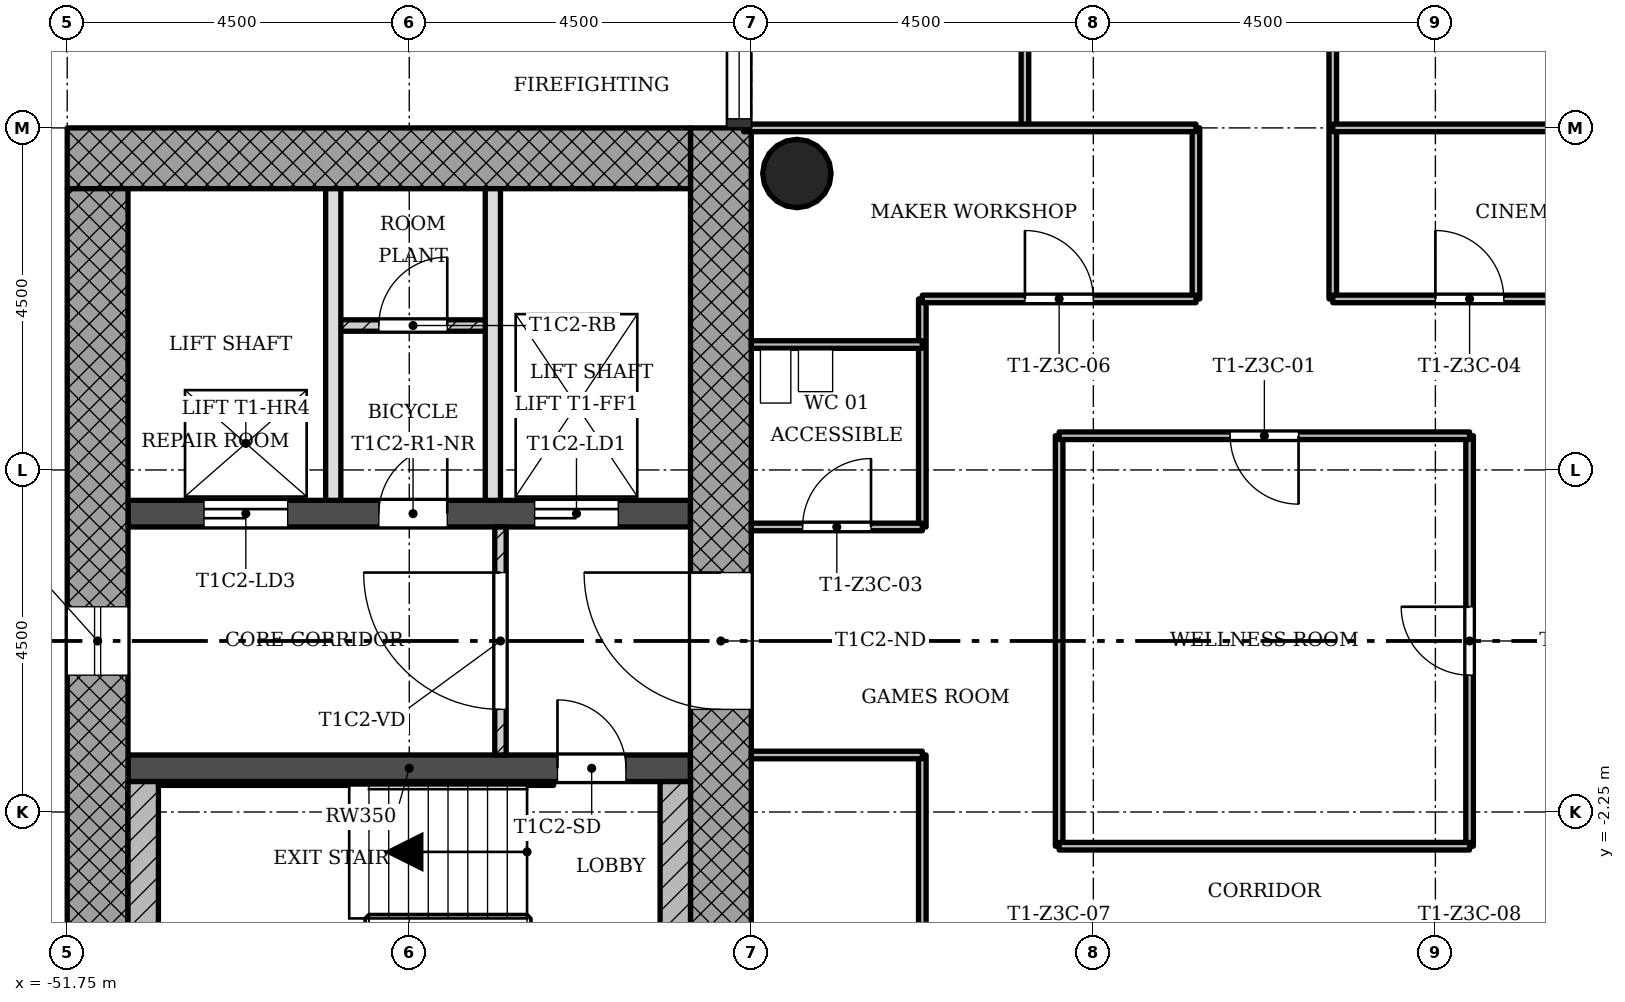
"""IFC4 building model, lengths in metres.
Left out: names, types, materials, properties, quantities, classifications, styles, units other than length and angle.
Written with IfcOpenShell. Run it as: python <this file> out.ifc"""

import sys

from ifc_helpers import new_model, si_unit, direction, frame, frame_2d, origin, origin_2d, place, context, subcontext, project, spatial, rectangle, hollow_circle, extrude, element, fill, save


model = new_model("IFC4")
c1 = context("Model", 3, precision=1e-05, world=origin(), true_north=direction((0.0, 1.0)))
c2 = subcontext(c1, "Body", "Model", "MODEL_VIEW")
j1 = project(units=[si_unit("LENGTHUNIT", "METRE"), si_unit("PLANEANGLEUNIT", "RADIAN")], contexts=[c1])
p1 = place(None, origin())
s1 = spatial("IfcSite", under=j1, at=p1, CompositionType="ELEMENT")
p2 = place(p1, origin())
s2 = spatial("IfcBuilding", under=s1, at=p2, CompositionType="ELEMENT")
p3 = place(p2, frame((0.0, 0.0, 160.9)))
s3 = spatial("IfcBuildingStorey", under=s2, at=p3, CompositionType="ELEMENT", Elevation=160.9)
p4 = place(p3, frame((-43.15, -5.95, 0.0), z_axis=(0.0, 0.0, 1.0), x_axis=(0.0, 1.0, 0.0)))
e1 = element("IfcWall", 1, at=p4, inside=s3, PredefinedType="SHEAR", context=c2, shape_type="SweptSolid", body=[
    extrude(rectangle(XDim=12.7, YDim=0.8, at=frame_2d((6.35, 0.0))), origin(), (0.0, 0.0, 1.0), 3.4),
])
p5 = place(p4, frame((5.05, 0.0, 0.0)))
e2 = element("IfcOpeningElement", 2, at=p5, cuts=e1, PredefinedType="OPENING", context=c2, shape_type="SweptSolid", body=[
    extrude(rectangle(XDim=1.8, YDim=2.1, at=frame_2d((0.9, 1.05))), frame((0.0, 0.41, 0.0), z_axis=(0.0, -1.0, 0.0), x_axis=(1.0, 0.0, 0.0)), (0.0, 0.0, 1.0), 0.82),
])
p6 = place(p3, frame((-43.55, 6.35, 0.0), z_axis=(0.0, 0.0, 1.0), x_axis=(-1.0, 0.0, 0.0)))
e3 = element("IfcWall", 3, at=p6, inside=s3, PredefinedType="SHEAR", context=c2, shape_type="SweptSolid", body=[
    extrude(rectangle(XDim=8.2, YDim=0.8, at=frame_2d((4.1, 0.0))), origin(), (0.0, 0.0, 1.0), 3.4),
])
p7 = place(p3, frame((-51.35, 5.95, 0.0), z_axis=(0.0, 0.0, 1.0), x_axis=(0.0, -1.0, 0.0)))
e4 = element("IfcWall", 4, at=p7, inside=s3, PredefinedType="SHEAR", context=c2, shape_type="SweptSolid", body=[
    extrude(rectangle(XDim=12.7, YDim=0.8, at=frame_2d((6.35, 0.0))), origin(), (0.0, 0.0, 1.0), 3.4),
])
p8 = place(p7, frame((5.5, 0.0, 0.45)))
e5 = element("IfcOpeningElement", 5, at=p8, cuts=e4, PredefinedType="OPENING", context=c2, shape_type="SweptSolid", body=[
    extrude(rectangle(XDim=0.9, YDim=2.4, at=frame_2d((0.45, 1.2))), frame((0.0, 0.41, 0.0), z_axis=(0.0, -1.0, 0.0), x_axis=(1.0, 0.0, 0.0)), (0.0, 0.0, 1.0), 0.82),
])
p9 = place(p3, frame((-50.95, -1.675, 0.0), z_axis=(0.0, 0.0, 1.0), x_axis=(1.0, 0.0, 0.0)))
e6 = element("IfcWall", 6, at=p9, inside=s3, PredefinedType="SHEAR", context=c2, shape_type="SweptSolid", body=[
    extrude(rectangle(XDim=7.4, YDim=0.35, at=frame_2d((3.7, 0.0))), origin(), (0.0, 0.0, 1.0), 3.4),
])
p10 = place(p9, frame((5.65, 0.0, 0.0)))
e7 = element("IfcOpeningElement", 7, at=p10, cuts=e6, PredefinedType="OPENING", context=c2, shape_type="SweptSolid", body=[
    extrude(rectangle(XDim=0.9, YDim=2.1, at=frame_2d((0.45, 1.05))), frame((0.0, 0.185, 0.0), z_axis=(0.0, -1.0, 0.0), x_axis=(1.0, 0.0, 0.0)), (0.0, 0.0, 1.0), 0.37),
])
p11 = place(p3, frame((-50.95, 1.675, 0.0), z_axis=(0.0, 0.0, 1.0), x_axis=(1.0, 0.0, 0.0)))
e8 = element("IfcWall", 8, at=p11, inside=s3, PredefinedType="SHEAR", context=c2, shape_type="SweptSolid", body=[
    extrude(rectangle(XDim=7.4, YDim=0.35, at=frame_2d((3.7, 0.0))), origin(), (0.0, 0.0, 1.0), 3.4),
])
p12 = place(p11, frame((5.35, 0.0, 0.0)))
e9 = element("IfcOpeningElement", 9, at=p12, cuts=e8, PredefinedType="OPENING", context=c2, shape_type="SweptSolid", body=[
    extrude(rectangle(XDim=1.1, YDim=2.1, at=frame_2d((0.55, 1.05))), frame((0.0, 0.185, 0.0), z_axis=(0.0, -1.0, 0.0), x_axis=(1.0, 0.0, 0.0)), (0.0, 0.0, 1.0), 0.37),
])
p13 = place(p11, frame((1.0, 0.0, 0.0)))
e10 = element("IfcOpeningElement", 10, at=p13, cuts=e8, PredefinedType="OPENING", context=c2, shape_type="SweptSolid", body=[
    extrude(rectangle(XDim=1.1, YDim=2.1, at=frame_2d((0.55, 1.05))), frame((0.0, 0.185, 0.0), z_axis=(0.0, -1.0, 0.0), x_axis=(1.0, 0.0, 0.0)), (0.0, 0.0, 1.0), 0.37),
])
p14 = place(p11, frame((3.3, 0.0, 0.0)))
e11 = element("IfcOpeningElement", 11, at=p14, cuts=e8, PredefinedType="OPENING", context=c2, shape_type="SweptSolid", body=[
    extrude(rectangle(XDim=0.9, YDim=2.1, at=frame_2d((0.45, 1.05))), frame((0.0, 0.185, 0.0), z_axis=(0.0, -1.0, 0.0), x_axis=(1.0, 0.0, 0.0)), (0.0, 0.0, 1.0), 0.37),
])
p15 = place(p3, frame((-42.15, 6.15, 0.0), z_axis=(0.0, 0.0, 1.0), x_axis=(1.0, 0.0, 0.0)))
e12 = element("IfcColumn", 12, at=p15, inside=s3, PredefinedType="COLUMN", context=c2, shape_type="SweptSolid", body=[
    extrude(hollow_circle(Radius=0.45, WallThickness=0.032, at=origin_2d()), origin(), (0.0, 0.0, 1.0), 3.4),
])
p16 = place(p3, frame((-46.05, 1.5, 0.0), z_axis=(0.0, 0.0, 1.0), x_axis=(0.0, -1.0, 0.0)))
e13 = element("IfcWall", 13, at=p16, inside=s3, PredefinedType="PARTITIONING", context=c2, shape_type="SweptSolid", body=[
    extrude(rectangle(XDim=3.0, YDim=0.15, at=frame_2d((1.5, 0.0))), origin(), (0.0, 0.0, 1.0), 3.0),
])
p17 = place(p16, frame((0.6, 0.0, 0.0)))
e14 = element("IfcOpeningElement", 14, at=p17, cuts=e13, PredefinedType="OPENING", context=c2, shape_type="SweptSolid", body=[
    extrude(rectangle(XDim=1.8, YDim=2.1, at=frame_2d((0.9, 1.05))), frame((0.0, 0.085, 0.0), z_axis=(0.0, -1.0, 0.0), x_axis=(1.0, 0.0, 0.0)), (0.0, 0.0, 1.0), 0.17),
])
for number, where, z_axis, x_axis in (
    (15, (-48.25, 5.95, 0.0), (0.0, 0.0, 1.0), (0.0, -1.0, 0.0)),
    (16, (-46.15, 5.95, 0.0), (0.0, 0.0, 1.0), (0.0, -1.0, 0.0)),
):
    element("IfcWall", number, at=place(p3, frame(where, z_axis=z_axis, x_axis=x_axis)), inside=s3, PredefinedType="SOLIDWALL", context=c2, shape_type="SweptSolid", body=[
        extrude(rectangle(XDim=4.1, YDim=0.2, at=frame_2d((2.05, 0.0))), origin(), (0.0, 0.0, 1.0), 3.0),
    ])
p18 = place(p3, frame((-46.15, 4.15, 0.0), z_axis=(0.0, 0.0, 1.0), x_axis=(-1.0, 0.0, 0.0)))
e17 = element("IfcWall", 17, at=p18, inside=s3, PredefinedType="PARTITIONING", context=c2, shape_type="SweptSolid", body=[
    extrude(rectangle(XDim=2.1, YDim=0.15, at=frame_2d((1.05, 0.0))), origin(), (0.0, 0.0, 1.0), 3.0),
])
p19 = place(p18, frame((0.6, 0.0, 0.0)))
e18 = element("IfcOpeningElement", 18, at=p19, cuts=e17, PredefinedType="OPENING", context=c2, shape_type="SweptSolid", body=[
    extrude(rectangle(XDim=0.9, YDim=2.1, at=frame_2d((0.45, 1.05))), frame((0.0, 0.085, 0.0), z_axis=(0.0, -1.0, 0.0), x_axis=(1.0, 0.0, 0.0)), (0.0, 0.0, 1.0), 0.17),
])
for number, where, z_axis, x_axis in (
    (19, (-40.5, -4.5, 0.0), (0.0, 0.0, 1.0), (0.0, 1.0, 0.0)),
    (20, (-40.5, 1.5, 0.0), (0.0, 0.0, 1.0), (0.0, 1.0, 0.0)),
):
    element("IfcWall", number, at=place(p3, frame(where, z_axis=z_axis, x_axis=x_axis)), inside=s3, PredefinedType="PARTITIONING", context=c2, shape_type="SweptSolid", body=[
        extrude(rectangle(XDim=3.0, YDim=0.1, at=frame_2d((1.5, 0.0))), origin(), (0.0, 0.0, 1.0), 3.0),
    ])
p20 = place(p3, frame((-39.15, 6.75, 0.0), z_axis=(0.0, 0.0, 1.0), x_axis=(0.0, 1.0, 0.0)))
e21 = element("IfcWall", 21, at=p20, inside=s3, PredefinedType="PARTITIONING", context=c2, shape_type="SweptSolid", body=[
    extrude(rectangle(XDim=4.5, YDim=0.1, at=frame_2d((2.25, 0.0))), origin(), (0.0, 0.0, 1.0), 3.0),
])
p21 = place(p20, frame((1.8, 0.0, 0.0)))
e22 = element("IfcOpeningElement", 22, at=p21, cuts=e21, PredefinedType="OPENING", context=c2, shape_type="SweptSolid", body=[
    extrude(rectangle(XDim=0.9, YDim=2.1, at=frame_2d((0.45, 1.05))), frame((0.0, 0.06, 0.0), z_axis=(0.0, -1.0, 0.0), x_axis=(1.0, 0.0, 0.0)), (0.0, 0.0, 1.0), 0.12),
])
p22 = place(p3, frame((-38.7, -2.7, 0.0), z_axis=(0.0, 0.0, 1.0), x_axis=(0.0, 1.0, 0.0)))
e23 = element("IfcWall", 23, at=p22, inside=s3, PredefinedType="PARTITIONING", context=c2, shape_type="SweptSolid", body=[
    extrude(rectangle(XDim=5.4, YDim=0.1, at=frame_2d((2.7, 0.0))), origin(), (0.0, 0.0, 1.0), 3.0),
])
p23 = place(p3, frame((-36.9, 4.5, 0.0), z_axis=(0.0, 0.0, 1.0), x_axis=(0.0, 1.0, 0.0)))
e24 = element("IfcWall", 24, at=p23, inside=s3, PredefinedType="PARTITIONING", context=c2, shape_type="SweptSolid", body=[
    extrude(rectangle(XDim=2.25, YDim=0.1, at=frame_2d((1.125, 0.0))), origin(), (0.0, 0.0, 1.0), 3.0),
])
p24 = place(p3, frame((-35.1, 4.5, 0.0), z_axis=(0.0, 0.0, 1.0), x_axis=(0.0, 1.0, 0.0)))
e25 = element("IfcWall", 25, at=p24, inside=s3, PredefinedType="PARTITIONING", context=c2, shape_type="SweptSolid", body=[
    extrude(rectangle(XDim=4.05, YDim=0.1, at=frame_2d((2.025, 0.0))), origin(), (0.0, 0.0, 1.0), 3.0),
])
p25 = place(p3, frame((-33.3, -2.7, 0.0), z_axis=(0.0, 0.0, 1.0), x_axis=(0.0, 1.0, 0.0)))
e26 = element("IfcWall", 26, at=p25, inside=s3, PredefinedType="PARTITIONING", context=c2, shape_type="SweptSolid", body=[
    extrude(rectangle(XDim=5.4, YDim=0.1, at=frame_2d((2.7, 0.0))), origin(), (0.0, 0.0, 1.0), 3.0),
])
p26 = place(p25, frame((2.25, 0.0, 0.0)))
e27 = element("IfcOpeningElement", 27, at=p26, cuts=e26, PredefinedType="OPENING", context=c2, shape_type="SweptSolid", body=[
    extrude(rectangle(XDim=0.9, YDim=2.1, at=frame_2d((0.45, 1.05))), frame((0.0, 0.06, 0.0), z_axis=(0.0, -1.0, 0.0), x_axis=(1.0, 0.0, 0.0)), (0.0, 0.0, 1.0), 0.12),
])
p27 = place(p3, frame((-38.7, -2.7, 0.0), z_axis=(0.0, 0.0, 1.0), x_axis=(1.0, 0.0, 0.0)))
e28 = element("IfcWall", 28, at=p27, inside=s3, PredefinedType="PARTITIONING", context=c2, shape_type="SweptSolid", body=[
    extrude(rectangle(XDim=5.4, YDim=0.1, at=frame_2d((2.7, 0.0))), origin(), (0.0, 0.0, 1.0), 3.0),
])
p28 = place(p3, frame((-42.75, -1.5, 0.0), z_axis=(0.0, 0.0, 1.0), x_axis=(1.0, 0.0, 0.0)))
e29 = element("IfcWall", 29, at=p28, inside=s3, PredefinedType="PARTITIONING", context=c2, shape_type="SweptSolid", body=[
    extrude(rectangle(XDim=2.25, YDim=0.1, at=frame_2d((1.125, 0.0))), origin(), (0.0, 0.0, 1.0), 3.0),
])
p29 = place(p3, frame((-42.75, 1.5, 0.0), z_axis=(0.0, 0.0, 1.0), x_axis=(1.0, 0.0, 0.0)))
e30 = element("IfcWall", 30, at=p29, inside=s3, PredefinedType="PARTITIONING", context=c2, shape_type="SweptSolid", body=[
    extrude(rectangle(XDim=2.25, YDim=0.1, at=frame_2d((1.125, 0.0))), origin(), (0.0, 0.0, 1.0), 3.0),
])
p30 = place(p29, frame((0.675, 0.0, 0.0)))
e31 = element("IfcOpeningElement", 31, at=p30, cuts=e30, PredefinedType="OPENING", context=c2, shape_type="SweptSolid", body=[
    extrude(rectangle(XDim=0.9, YDim=2.1, at=frame_2d((0.45, 1.05))), frame((0.0, 0.06, 0.0), z_axis=(0.0, -1.0, 0.0), x_axis=(1.0, 0.0, 0.0)), (0.0, 0.0, 1.0), 0.12),
])
p31 = place(p3, frame((-38.7, 2.7, 0.0), z_axis=(0.0, 0.0, 1.0), x_axis=(1.0, 0.0, 0.0)))
e32 = element("IfcWall", 32, at=p31, inside=s3, PredefinedType="PARTITIONING", context=c2, shape_type="SweptSolid", body=[
    extrude(rectangle(XDim=5.4, YDim=0.1, at=frame_2d((2.7, 0.0))), origin(), (0.0, 0.0, 1.0), 3.0),
])
p32 = place(p31, frame((2.25, 0.0, 0.0)))
e33 = element("IfcOpeningElement", 33, at=p32, cuts=e32, PredefinedType="OPENING", context=c2, shape_type="SweptSolid", body=[
    extrude(rectangle(XDim=0.9, YDim=2.1, at=frame_2d((0.45, 1.05))), frame((0.0, 0.06, 0.0), z_axis=(0.0, -1.0, 0.0), x_axis=(1.0, 0.0, 0.0)), (0.0, 0.0, 1.0), 0.12),
])
p33 = place(p3, frame((-42.75, 3.9, 0.0), z_axis=(0.0, 0.0, 1.0), x_axis=(1.0, 0.0, 0.0)))
e34 = element("IfcWall", 34, at=p33, inside=s3, PredefinedType="PARTITIONING", context=c2, shape_type="SweptSolid", body=[
    extrude(rectangle(XDim=2.25, YDim=0.1, at=frame_2d((1.125, 0.0))), origin(), (0.0, 0.0, 1.0), 3.0),
])
p34 = place(p3, frame((-40.5, 4.5, 0.0), z_axis=(0.0, 0.0, 1.0), x_axis=(1.0, 0.0, 0.0)))
e35 = element("IfcWall", 35, at=p34, inside=s3, PredefinedType="PARTITIONING", context=c2, shape_type="SweptSolid", body=[
    extrude(rectangle(XDim=3.6, YDim=0.1, at=frame_2d((1.8, 0.0))), origin(), (0.0, 0.0, 1.0), 3.0),
])
p35 = place(p34, frame((1.35, 0.0, 0.0)))
e36 = element("IfcOpeningElement", 36, at=p35, cuts=e35, PredefinedType="OPENING", context=c2, shape_type="SweptSolid", body=[
    extrude(rectangle(XDim=0.9, YDim=2.1, at=frame_2d((0.45, 1.05))), frame((0.0, 0.06, 0.0), z_axis=(0.0, -1.0, 0.0), x_axis=(1.0, 0.0, 0.0)), (0.0, 0.0, 1.0), 0.12),
])
p36 = place(p3, frame((-35.1, 4.5, 0.0), z_axis=(0.0, 0.0, 1.0), x_axis=(1.0, 0.0, 0.0)))
e37 = element("IfcWall", 37, at=p36, inside=s3, PredefinedType="PARTITIONING", context=c2, shape_type="SweptSolid", body=[
    extrude(rectangle(XDim=5.85, YDim=0.1, at=frame_2d((2.925, 0.0))), origin(), (0.0, 0.0, 1.0), 3.0),
])
p37 = place(p36, frame((1.35, 0.0, 0.0)))
e38 = element("IfcOpeningElement", 38, at=p37, cuts=e37, PredefinedType="OPENING", context=c2, shape_type="SweptSolid", body=[
    extrude(rectangle(XDim=0.9, YDim=2.1, at=frame_2d((0.45, 1.05))), frame((0.0, 0.06, 0.0), z_axis=(0.0, -1.0, 0.0), x_axis=(1.0, 0.0, 0.0)), (0.0, 0.0, 1.0), 0.12),
])
for number, where, z_axis, x_axis in (
    (39, (-42.85, 6.75, 0.0), (0.0, 0.0, 1.0), (1.0, 0.0, 0.0)),
    (40, (-35.1, 6.75, 0.0), (0.0, 0.0, 1.0), (1.0, 0.0, 0.0)),
):
    element("IfcWall", number, at=place(p3, frame(where, z_axis=z_axis, x_axis=x_axis)), inside=s3, PredefinedType="PARTITIONING", context=c2, shape_type="SweptSolid", body=[
        extrude(rectangle(XDim=5.95, YDim=0.1, at=frame_2d((2.975, 0.0))), origin(), (0.0, 0.0, 1.0), 3.0),
    ])
for number, where, z_axis, x_axis in (
    (41, (-50.75, -1.85, 0.0), (0.0, 0.0, 1.0), (0.0, -1.0, 0.0)),
    (42, (-43.75, -1.85, 0.0), (0.0, 0.0, 1.0), (0.0, -1.0, 0.0)),
):
    element("IfcWall", number, at=place(p3, frame(where, z_axis=z_axis, x_axis=x_axis)), inside=s3, PredefinedType="SHEAR", context=c2, shape_type="SweptSolid", body=[
        extrude(rectangle(XDim=4.1, YDim=0.4, at=frame_2d((2.05, 0.0))), origin(), (0.0, 0.0, 1.0), 3.4),
    ])
p38 = place(p3, frame((-45.35, -1.875, 0.0), z_axis=(0.0, 0.0, 1.0), x_axis=(-1.0, 0.0, 0.0)))
e43 = element("IfcWall", 43, at=p38, inside=s3, PredefinedType="SHEAR", context=c2, shape_type="SweptSolid", body=[
    extrude(rectangle(XDim=5.2, YDim=0.05, at=frame_2d((2.6, 0.0))), origin(), (0.0, 0.0, 1.0), 3.4),
])
p39 = place(p8, origin())
e44 = element("IfcWindow", 44, at=p39, inside=s3, PartitioningType="SINGLE_PANEL", PredefinedType="WINDOW", context=c2, shape_type="SweptSolid", body=[
    extrude(rectangle(XDim=0.9, YDim=2.4, at=frame_2d((0.45, 1.2))), frame((0.0, 0.03, 0.0), z_axis=(0.0, -1.0, 0.0), x_axis=(1.0, 0.0, 0.0)), (0.0, 0.0, 1.0), 0.06),
])
fill(e5, e44)
p40 = place(p17, origin())
e45 = element("IfcDoor", 45, at=p40, inside=s3, OperationType="SINGLE_SWING_LEFT", PredefinedType="DOOR", context=c2, shape_type="SweptSolid", body=[
    extrude(rectangle(XDim=1.8, YDim=2.1, at=frame_2d((0.9, 1.05))), frame((0.0, 0.025, 0.0), z_axis=(0.0, -1.0, 0.0), x_axis=(1.0, 0.0, 0.0)), (0.0, 0.0, 1.0), 0.05),
])
fill(e14, e45)
p41 = place(p19, origin())
e46 = element("IfcDoor", 46, at=p41, inside=s3, OperationType="SINGLE_SWING_LEFT", PredefinedType="DOOR", context=c2, shape_type="SweptSolid", body=[
    extrude(rectangle(XDim=0.9, YDim=2.1, at=frame_2d((0.45, 1.05))), frame((0.0, 0.025, 0.0), z_axis=(0.0, -1.0, 0.0), x_axis=(1.0, 0.0, 0.0)), (0.0, 0.0, 1.0), 0.05),
])
fill(e18, e46)
p42 = place(p32, origin())
e47 = element("IfcDoor", 47, at=p42, inside=s3, OperationType="SINGLE_SWING_RIGHT", PredefinedType="DOOR", context=c2, shape_type="SweptSolid", body=[
    extrude(rectangle(XDim=0.9, YDim=2.1, at=frame_2d((0.45, 1.05))), frame((0.0, 0.025, 0.0), z_axis=(0.0, -1.0, 0.0), x_axis=(1.0, 0.0, 0.0)), (0.0, 0.0, 1.0), 0.05),
])
fill(e33, e47)
p43 = place(p26, origin())
e48 = element("IfcDoor", 48, at=p43, inside=s3, OperationType="SINGLE_SWING_LEFT", PredefinedType="DOOR", context=c2, shape_type="SweptSolid", body=[
    extrude(rectangle(XDim=0.9, YDim=2.1, at=frame_2d((0.45, 1.05))), frame((0.0, 0.025, 0.0), z_axis=(0.0, -1.0, 0.0), x_axis=(1.0, 0.0, 0.0)), (0.0, 0.0, 1.0), 0.05),
])
fill(e27, e48)
p44 = place(p30, origin())
e49 = element("IfcDoor", 49, at=p44, inside=s3, OperationType="SINGLE_SWING_LEFT", PredefinedType="DOOR", context=c2, shape_type="SweptSolid", body=[
    extrude(rectangle(XDim=0.9, YDim=2.1, at=frame_2d((0.45, 1.05))), frame((0.0, 0.025, 0.0), z_axis=(0.0, -1.0, 0.0), x_axis=(1.0, 0.0, 0.0)), (0.0, 0.0, 1.0), 0.05),
])
fill(e31, e49)
p45 = place(p37, origin())
e50 = element("IfcDoor", 50, at=p45, inside=s3, OperationType="SINGLE_SWING_RIGHT", PredefinedType="DOOR", context=c2, shape_type="SweptSolid", body=[
    extrude(rectangle(XDim=0.9, YDim=2.1, at=frame_2d((0.45, 1.05))), frame((0.0, 0.025, 0.0), z_axis=(0.0, -1.0, 0.0), x_axis=(1.0, 0.0, 0.0)), (0.0, 0.0, 1.0), 0.05),
])
fill(e38, e50)
p46 = place(p35, origin())
e51 = element("IfcDoor", 51, at=p46, inside=s3, OperationType="SINGLE_SWING_RIGHT", PredefinedType="DOOR", context=c2, shape_type="SweptSolid", body=[
    extrude(rectangle(XDim=0.9, YDim=2.1, at=frame_2d((0.45, 1.05))), frame((0.0, 0.025, 0.0), z_axis=(0.0, -1.0, 0.0), x_axis=(1.0, 0.0, 0.0)), (0.0, 0.0, 1.0), 0.05),
])
fill(e36, e51)
p47 = place(p10, origin())
e52 = element("IfcDoor", 52, at=p47, inside=s3, OperationType="SINGLE_SWING_RIGHT", PredefinedType="DOOR", context=c2, shape_type="SweptSolid", body=[
    extrude(rectangle(XDim=0.9, YDim=2.1, at=frame_2d((0.45, 1.05))), frame((0.0, 0.025, 0.0), z_axis=(0.0, -1.0, 0.0), x_axis=(1.0, 0.0, 0.0)), (0.0, 0.0, 1.0), 0.05),
])
fill(e7, e52)
p48 = place(p12, origin())
e53 = element("IfcDoor", 53, at=p48, inside=s3, OperationType="SLIDING_TO_LEFT", PredefinedType="DOOR", context=c2, shape_type="SweptSolid", body=[
    extrude(rectangle(XDim=1.1, YDim=2.1, at=frame_2d((0.55, 1.05))), frame((0.0, 0.025, 0.0), z_axis=(0.0, -1.0, 0.0), x_axis=(1.0, 0.0, 0.0)), (0.0, 0.0, 1.0), 0.05),
])
fill(e9, e53)
p49 = place(p13, origin())
e54 = element("IfcDoor", 54, at=p49, inside=s3, OperationType="SLIDING_TO_LEFT", PredefinedType="DOOR", context=c2, shape_type="SweptSolid", body=[
    extrude(rectangle(XDim=1.1, YDim=2.1, at=frame_2d((0.55, 1.05))), frame((0.0, 0.025, 0.0), z_axis=(0.0, -1.0, 0.0), x_axis=(1.0, 0.0, 0.0)), (0.0, 0.0, 1.0), 0.05),
])
fill(e10, e54)
p50 = place(p14, origin())
e55 = element("IfcDoor", 55, at=p50, inside=s3, OperationType="SINGLE_SWING_LEFT", PredefinedType="DOOR", context=c2, shape_type="SweptSolid", body=[
    extrude(rectangle(XDim=0.9, YDim=2.1, at=frame_2d((0.45, 1.05))), frame((0.0, 0.025, 0.0), z_axis=(0.0, -1.0, 0.0), x_axis=(1.0, 0.0, 0.0)), (0.0, 0.0, 1.0), 0.05),
])
fill(e11, e55)
p51 = place(p5, origin())
e56 = element("IfcDoor", 56, at=p51, inside=s3, OperationType="SINGLE_SWING_LEFT", PredefinedType="DOOR", context=c2, shape_type="SweptSolid", body=[
    extrude(rectangle(XDim=1.8, YDim=2.1, at=frame_2d((0.9, 1.05))), frame((0.0, 0.025, 0.0), z_axis=(0.0, -1.0, 0.0), x_axis=(1.0, 0.0, 0.0)), (0.0, 0.0, 1.0), 0.05),
])
fill(e2, e56)
save(model, sys.argv[1])
